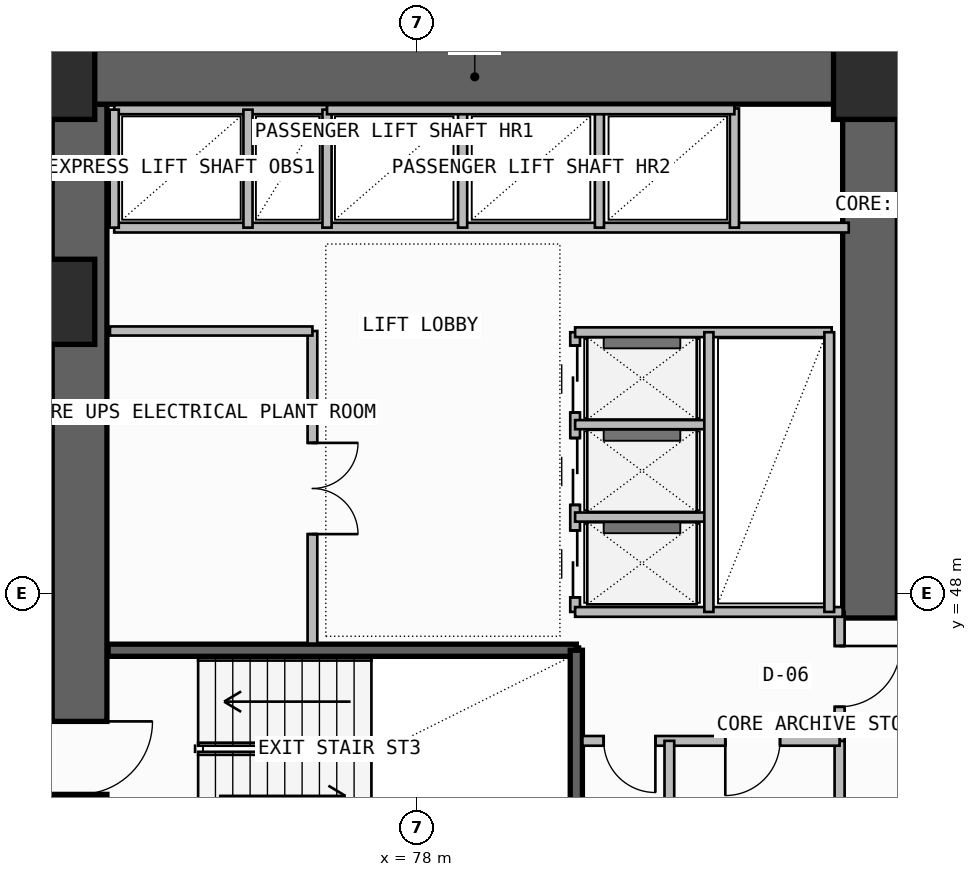
"""IFC4 building model, lengths in metres.
Left out: names, types, materials, properties, quantities, classifications, styles, units other than length and angle.
Written with IfcOpenShell. Run it as: python <this file> out.ifc"""

import sys

from ifc_helpers import new_model, si_unit, direction, frame, frame_2d, origin, origin_2d, place, context, subcontext, project, spatial, rectangle, extrude, element, fill, save


model = new_model("IFC4")
c1 = context("Model", 3, precision=1e-05, world=origin(), true_north=direction((0.0, 1.0)))
c2 = subcontext(c1, "Body", "Model", "MODEL_VIEW")
j1 = project(units=[si_unit("LENGTHUNIT", "METRE"), si_unit("PLANEANGLEUNIT", "RADIAN")], contexts=[c1])
p1 = place(None, origin())
s1 = spatial("IfcSite", under=j1, at=p1, CompositionType="ELEMENT")
p2 = place(p1, origin())
s2 = spatial("IfcBuilding", under=s1, at=p2, CompositionType="ELEMENT")
p3 = place(p2, frame((0.0, 0.0, 139.5)))
s3 = spatial("IfcBuildingStorey", under=s2, at=p3, CompositionType="ELEMENT", Elevation=139.5)
p4 = place(p3, frame((72.45, 43.35, -0.26), z_axis=(0.0, 0.0, 1.0), x_axis=(0.0, 1.0, 0.0)))
e1 = element("IfcWall", 1, at=p4, inside=s3, PredefinedType="SHEAR", context=c2, shape_type="SweptSolid", body=[
    extrude(rectangle(XDim=12.7, YDim=0.9, at=frame_2d((6.35, 0.0))), origin(), (0.0, 0.0, 1.0), 3.6),
])
p5 = place(p4, frame((1.35, 0.0, 0.26)))
e2 = element("IfcOpeningElement", 2, at=p5, cuts=e1, PredefinedType="OPENING", context=c2, shape_type="SweptSolid", body=[
    extrude(rectangle(XDim=1.2, YDim=2.2, at=frame_2d((0.6, 1.1))), frame((0.0, 0.46, 0.0), z_axis=(0.0, -1.0, 0.0), x_axis=(1.0, 0.0, 0.0)), (0.0, 0.0, 1.0), 0.92),
])
p6 = place(p3, frame((72.0, 56.5, -0.26), z_axis=(0.0, 0.0, 1.0), x_axis=(1.0, 0.0, 0.0)))
e3 = element("IfcWall", 3, at=p6, inside=s3, PredefinedType="SHEAR", context=c2, shape_type="SweptSolid", body=[
    extrude(rectangle(XDim=13.9, YDim=0.9, at=frame_2d((6.95, 0.0))), origin(), (0.0, 0.0, 1.0), 3.6),
])
p7 = place(p3, frame((85.45, 47.6, -0.26), z_axis=(0.0, 0.0, 1.0), x_axis=(0.0, 1.0, 0.0)))
e4 = element("IfcWall", 4, at=p7, inside=s3, PredefinedType="SHEAR", context=c2, shape_type="SweptSolid", body=[
    extrude(rectangle(XDim=8.45, YDim=0.9, at=frame_2d((4.225, 0.0))), origin(), (0.0, 0.0, 1.0), 3.6),
])
for number, where, z_axis, x_axis in (
    (5, (72.0, 52.8, 0.0), (0.0, 0.0, 1.0), (1.0, 0.0, 0.0)),
    (6, (72.0, 56.5, 0.0), (0.0, 0.0, 1.0), (1.0, 0.0, 0.0)),
    (7, (85.55, 56.5, 0.0), (0.0, 0.0, 1.0), (1.0, 0.0, 0.0)),
):
    element("IfcColumn", number, at=place(p3, frame(where, z_axis=z_axis, x_axis=x_axis)), inside=s3, PredefinedType="COLUMN", context=c2, shape_type="SweptSolid", body=[
        extrude(rectangle(XDim=1.4, YDim=1.4, at=origin_2d()), origin(), (0.0, 0.0, 1.0), 3.6),
    ])
p8 = place(p3, frame((72.92, 47.07, -0.26), z_axis=(0.0, 0.0, 1.0), x_axis=(1.0, 0.0, 0.0)))
e8 = element("IfcWall", 8, at=p8, inside=s3, PredefinedType="SOLIDWALL", context=c2, shape_type="SweptSolid", body=[
    extrude(rectangle(XDim=7.7, YDim=0.2, at=frame_2d((3.85, 0.0))), origin(), (0.0, 0.0, 1.0), 3.6),
])
p9 = place(p3, frame((80.62, 43.83, -0.26), z_axis=(0.0, 0.0, 1.0), x_axis=(0.0, 1.0, 0.0)))
e9 = element("IfcWall", 9, at=p9, inside=s3, PredefinedType="SOLIDWALL", context=c2, shape_type="SweptSolid", body=[
    extrude(rectangle(XDim=3.24, YDim=0.2, at=frame_2d((1.62, 0.0))), origin(), (0.0, 0.0, 1.0), 3.6),
])
p10 = place(p3, frame((84.95, 43.68, 0.0), z_axis=(0.0, 0.0, 1.0), x_axis=(0.0, 1.0, 0.0)))
e10 = element("IfcWall", 10, at=p10, inside=s3, PredefinedType="PLUMBINGWALL", context=c2, shape_type="SweptSolid", body=[
    extrude(rectangle(XDim=1.9, YDim=0.165, at=frame_2d((0.95, 0.0))), origin(), (0.0, 0.0, 1.0), 3.34),
])
p11 = place(p3, frame((84.95, 45.58, 0.0), z_axis=(0.0, 0.0, 1.0), x_axis=(0.0, 1.0, 0.0)))
e11 = element("IfcWall", 11, at=p11, inside=s3, PredefinedType="PARTITIONING", context=c2, shape_type="SweptSolid", body=[
    extrude(rectangle(XDim=2.12, YDim=0.165, at=frame_2d((1.06, 0.0))), origin(), (0.0, 0.0, 1.0), 3.34),
])
p12 = place(p11, frame((0.56, 0.0, 0.0)))
e12 = element("IfcOpeningElement", 12, at=p12, cuts=e11, PredefinedType="OPENING", context=c2, shape_type="SweptSolid", body=[
    extrude(rectangle(XDim=1.0, YDim=2.2, at=frame_2d((0.5, 1.1))), frame((0.0, 0.093, 0.0), z_axis=(0.0, -1.0, 0.0), x_axis=(1.0, 0.0, 0.0)), (0.0, 0.0, 1.0), 0.185),
])
p13 = place(p3, frame((80.72, 45.58, 0.0), z_axis=(0.0, 0.0, 1.0), x_axis=(1.0, 0.0, 0.0)))
e13 = element("IfcWall", 13, at=p13, inside=s3, PredefinedType="PLUMBINGWALL", context=c2, shape_type="SweptSolid", body=[
    extrude(rectangle(XDim=4.23, YDim=0.16, at=frame_2d((2.115, 0.0))), origin(), (0.0, 0.0, 1.0), 3.34),
])
p14 = place(p13, frame((0.35, 0.0, 0.0)))
e14 = element("IfcOpeningElement", 14, at=p14, cuts=e13, PredefinedType="OPENING", context=c2, shape_type="SweptSolid", body=[
    extrude(rectangle(XDim=0.85, YDim=2.05, at=frame_2d((0.425, 1.025))), frame((0.0, 0.09, 0.0), z_axis=(0.0, -1.0, 0.0), x_axis=(1.0, 0.0, 0.0)), (0.0, 0.0, 1.0), 0.18),
])
p15 = place(p13, frame((2.35, 0.0, 0.0)))
e15 = element("IfcOpeningElement", 15, at=p15, cuts=e13, PredefinedType="OPENING", context=c2, shape_type="SweptSolid", body=[
    extrude(rectangle(XDim=0.9, YDim=2.1, at=frame_2d((0.45, 1.05))), frame((0.0, 0.09, 0.0), z_axis=(0.0, -1.0, 0.0), x_axis=(1.0, 0.0, 0.0)), (0.0, 0.0, 1.0), 0.18),
])
p16 = place(p3, frame((82.15, 43.68, 0.0), z_axis=(0.0, 0.0, 1.0), x_axis=(0.0, 1.0, 0.0)))
e16 = element("IfcWall", 16, at=p16, inside=s3, PredefinedType="PLUMBINGWALL", context=c2, shape_type="SweptSolid", body=[
    extrude(rectangle(XDim=1.9, YDim=0.16, at=frame_2d((0.95, 0.0))), origin(), (0.0, 0.0, 1.0), 3.34),
])
p17 = place(p3, frame((76.28, 47.18, 0.0), z_axis=(0.0, 0.0, 1.0), x_axis=(0.0, 1.0, 0.0)))
e17 = element("IfcWall", 17, at=p17, inside=s3, PredefinedType="SOLIDWALL", context=c2, shape_type="SweptSolid", body=[
    extrude(rectangle(XDim=5.14, YDim=0.16, at=frame_2d((2.57, 0.0))), origin(), (0.0, 0.0, 1.0), 3.34),
])
p18 = place(p17, frame((1.8, 0.0, 0.0)))
e18 = element("IfcOpeningElement", 18, at=p18, cuts=e17, PredefinedType="OPENING", context=c2, shape_type="SweptSolid", body=[
    extrude(rectangle(XDim=1.5, YDim=2.25, at=frame_2d((0.75, 1.125))), frame((0.0, 0.09, 0.0), z_axis=(0.0, -1.0, 0.0), x_axis=(1.0, 0.0, 0.0)), (0.0, 0.0, 1.0), 0.18),
])
p19 = place(p3, frame((72.95, 52.32, 0.0), z_axis=(0.0, 0.0, 1.0), x_axis=(1.0, 0.0, 0.0)))
e19 = element("IfcWall", 19, at=p19, inside=s3, PredefinedType="SOLIDWALL", context=c2, shape_type="SweptSolid", body=[
    extrude(rectangle(XDim=3.33, YDim=0.15, at=frame_2d((1.665, 0.0))), origin(), (0.0, 0.0, 1.0), 3.34),
])
p20 = place(p3, frame((80.6, 47.7, 0.0), z_axis=(0.0, 0.0, 1.0), x_axis=(0.0, 1.0, 0.0)))
e20 = element("IfcWall", 20, at=p20, inside=s3, PredefinedType="SOLIDWALL", context=c2, shape_type="SweptSolid", body=[
    extrude(rectangle(XDim=4.6, YDim=0.16, at=frame_2d((2.3, 0.0))), origin(), (0.0, 0.0, 1.0), 3.34),
])
p21 = place(p20, frame((0.24, 0.0, 0.0)))
e21 = element("IfcOpeningElement", 21, at=p21, cuts=e20, PredefinedType="OPENING", context=c2, shape_type="SweptSolid", body=[
    extrude(rectangle(XDim=1.1, YDim=2.25, at=frame_2d((0.55, 1.125))), frame((0.0, 0.09, 0.0), z_axis=(0.0, -1.0, 0.0), x_axis=(1.0, 0.0, 0.0)), (0.0, 0.0, 1.0), 0.18),
])
p22 = place(p20, frame((1.76, 0.0, 0.0)))
e22 = element("IfcOpeningElement", 22, at=p22, cuts=e20, PredefinedType="OPENING", context=c2, shape_type="SweptSolid", body=[
    extrude(rectangle(XDim=1.1, YDim=2.25, at=frame_2d((0.55, 1.125))), frame((0.0, 0.09, 0.0), z_axis=(0.0, -1.0, 0.0), x_axis=(1.0, 0.0, 0.0)), (0.0, 0.0, 1.0), 0.18),
])
p23 = place(p20, frame((3.28, 0.0, 0.0)))
e23 = element("IfcOpeningElement", 23, at=p23, cuts=e20, PredefinedType="OPENING", context=c2, shape_type="SweptSolid", body=[
    extrude(rectangle(XDim=1.1, YDim=2.25, at=frame_2d((0.55, 1.125))), frame((0.0, 0.09, 0.0), z_axis=(0.0, -1.0, 0.0), x_axis=(1.0, 0.0, 0.0)), (0.0, 0.0, 1.0), 0.18),
])
p24 = place(p3, frame((80.6, 47.7, 0.0), z_axis=(0.0, 0.0, 1.0), x_axis=(1.0, 0.0, 0.0)))
e24 = element("IfcWall", 24, at=p24, inside=s3, PredefinedType="SOLIDWALL", context=c2, shape_type="SweptSolid", body=[
    extrude(rectangle(XDim=4.4, YDim=0.16, at=frame_2d((2.2, 0.0))), origin(), (0.0, 0.0, 1.0), 3.34),
])
p25 = place(p3, frame((80.6, 52.3, 0.0), z_axis=(0.0, 0.0, 1.0), x_axis=(1.0, 0.0, 0.0)))
e25 = element("IfcWall", 25, at=p25, inside=s3, PredefinedType="SOLIDWALL", context=c2, shape_type="SweptSolid", body=[
    extrude(rectangle(XDim=4.22, YDim=0.16, at=frame_2d((2.11, 0.0))), origin(), (0.0, 0.0, 1.0), 3.34),
])
for number, where, z_axis, x_axis in (
    (26, (80.6, 49.26, 0.0), (0.0, 0.0, 1.0), (1.0, 0.0, 0.0)),
    (27, (80.6, 50.78, 0.0), (0.0, 0.0, 1.0), (1.0, 0.0, 0.0)),
):
    element("IfcWall", number, at=place(p3, frame(where, z_axis=z_axis, x_axis=x_axis)), inside=s3, PredefinedType="PLUMBINGWALL", context=c2, shape_type="SweptSolid", body=[
        extrude(rectangle(XDim=2.2, YDim=0.15, at=frame_2d((1.1, 0.0))), origin(), (0.0, 0.0, 1.0), 3.34),
    ])
p26 = place(p3, frame((82.8, 47.7, 0.0), z_axis=(0.0, 0.0, 1.0), x_axis=(0.0, 1.0, 0.0)))
e28 = element("IfcWall", 28, at=p26, inside=s3, PredefinedType="PLUMBINGWALL", context=c2, shape_type="SweptSolid", body=[
    extrude(rectangle(XDim=4.6, YDim=0.15, at=frame_2d((2.3, 0.0))), origin(), (0.0, 0.0, 1.0), 3.34),
])
p27 = place(p3, frame((84.78, 47.7, 0.0), z_axis=(0.0, 0.0, 1.0), x_axis=(0.0, 1.0, 0.0)))
e29 = element("IfcWall", 29, at=p27, inside=s3, PredefinedType="SOLIDWALL", context=c2, shape_type="SweptSolid", body=[
    extrude(rectangle(XDim=4.6, YDim=0.16, at=frame_2d((2.3, 0.0))), origin(), (0.0, 0.0, 1.0), 3.34),
])
p28 = place(p3, frame((73.02, 54.02, 0.0), z_axis=(0.0, 0.0, 1.0), x_axis=(1.0, 0.0, 0.0)))
e30 = element("IfcWall", 30, at=p28, inside=s3, PredefinedType="SOLIDWALL", context=c2, shape_type="SweptSolid", body=[
    extrude(rectangle(XDim=12.08, YDim=0.16, at=frame_2d((6.04, 0.0))), origin(), (0.0, 0.0, 1.0), 3.34),
])
p29 = place(p3, frame((73.02, 55.96, 0.0), z_axis=(0.0, 0.0, 1.0), x_axis=(1.0, 0.0, 0.0)))
e31 = element("IfcWall", 31, at=p29, inside=s3, PredefinedType="SOLIDWALL", context=c2, shape_type="SweptSolid", body=[
    extrude(rectangle(XDim=3.5, YDim=0.15, at=frame_2d((1.75, 0.0))), origin(), (0.0, 0.0, 1.0), 3.34),
])
p30 = place(p3, frame((73.02, 54.02, 0.0), z_axis=(0.0, 0.0, 1.0), x_axis=(0.0, 1.0, 0.0)))
e32 = element("IfcWall", 32, at=p30, inside=s3, PredefinedType="PLUMBINGWALL", context=c2, shape_type="SweptSolid", body=[
    extrude(rectangle(XDim=1.94, YDim=0.15, at=frame_2d((0.97, 0.0))), origin(), (0.0, 0.0, 1.0), 3.34),
])
p31 = place(p3, frame((76.52, 54.02, 0.0), z_axis=(0.0, 0.0, 1.0), x_axis=(0.0, 1.0, 0.0)))
e33 = element("IfcWall", 33, at=p31, inside=s3, PredefinedType="SOLIDWALL", context=c2, shape_type="SweptSolid", body=[
    extrude(rectangle(XDim=1.94, YDim=0.15, at=frame_2d((0.97, 0.0))), origin(), (0.0, 0.0, 1.0), 3.34),
])
p32 = place(p3, frame((75.22, 54.02, 0.0), z_axis=(0.0, 0.0, 1.0), x_axis=(0.0, 1.0, 0.0)))
e34 = element("IfcWall", 34, at=p32, inside=s3, PredefinedType="PLUMBINGWALL", context=c2, shape_type="SweptSolid", body=[
    extrude(rectangle(XDim=1.94, YDim=0.15, at=frame_2d((0.97, 0.0))), origin(), (0.0, 0.0, 1.0), 3.34),
])
for number, where, z_axis, x_axis in (
    (35, (78.75, 54.02, 0.0), (0.0, 0.0, 1.0), (0.0, 1.0, 0.0)),
    (36, (81.0, 54.02, 0.0), (0.0, 0.0, 1.0), (0.0, 1.0, 0.0)),
):
    element("IfcWall", number, at=place(p3, frame(where, z_axis=z_axis, x_axis=x_axis)), inside=s3, PredefinedType="PLUMBINGWALL", context=c2, shape_type="SweptSolid", body=[
        extrude(rectangle(XDim=1.96, YDim=0.15, at=frame_2d((0.98, 0.0))), origin(), (0.0, 0.0, 1.0), 3.34),
    ])
p33 = place(p3, frame((83.22, 54.02, 0.0), z_axis=(0.0, 0.0, 1.0), x_axis=(0.0, 1.0, 0.0)))
e37 = element("IfcWall", 37, at=p33, inside=s3, PredefinedType="SOLIDWALL", context=c2, shape_type="SweptSolid", body=[
    extrude(rectangle(XDim=1.96, YDim=0.15, at=frame_2d((0.98, 0.0))), origin(), (0.0, 0.0, 1.0), 3.34),
])
p34 = place(p3, frame((76.52, 55.96, 0.0), z_axis=(0.0, 0.0, 1.0), x_axis=(1.0, 0.0, 0.0)))
e38 = element("IfcWall", 38, at=p34, inside=s3, PredefinedType="SOLIDWALL", context=c2, shape_type="SweptSolid", body=[
    extrude(rectangle(XDim=6.7, YDim=0.15, at=frame_2d((3.35, 0.0))), origin(), (0.0, 0.0, 1.0), 3.34),
])
p35 = place(p5, frame((1.2, 0.0, 0.0), z_axis=(0.0, 0.0, 1.0), x_axis=(-1.0, 0.0, 0.0)))
e39 = element("IfcDoor", 39, at=p35, inside=s3, OperationType="SINGLE_SWING_LEFT", PredefinedType="USERDEFINED", context=c2, shape_type="SweptSolid", body=[
    extrude(rectangle(XDim=1.2, YDim=2.2, at=frame_2d((0.6, 1.1))), frame((0.0, 0.025, 0.0), z_axis=(0.0, -1.0, 0.0), x_axis=(1.0, 0.0, 0.0)), (0.0, 0.0, 1.0), 0.05),
])
fill(e2, e39)
p36 = place(p12, frame((1.0, 0.0, 0.0), z_axis=(0.0, 0.0, 1.0), x_axis=(-1.0, 0.0, 0.0)))
e40 = element("IfcDoor", 40, at=p36, inside=s3, OperationType="SINGLE_SWING_LEFT", PredefinedType="DOOR", context=c2, shape_type="SweptSolid", body=[
    extrude(rectangle(XDim=1.0, YDim=2.2, at=frame_2d((0.5, 1.1))), frame((0.0, 0.025, 0.0), z_axis=(0.0, -1.0, 0.0), x_axis=(1.0, 0.0, 0.0)), (0.0, 0.0, 1.0), 0.05),
])
fill(e12, e40)
p37 = place(p14, frame((0.85, 0.0, 0.0), z_axis=(0.0, 0.0, 1.0), x_axis=(-1.0, 0.0, 0.0)))
e41 = element("IfcDoor", 41, at=p37, inside=s3, OperationType="SINGLE_SWING_LEFT", PredefinedType="DOOR", context=c2, shape_type="SweptSolid", body=[
    extrude(rectangle(XDim=0.85, YDim=2.05, at=frame_2d((0.425, 1.025))), frame((0.0, 0.025, 0.0), z_axis=(0.0, -1.0, 0.0), x_axis=(1.0, 0.0, 0.0)), (0.0, 0.0, 1.0), 0.05),
])
fill(e14, e41)
p38 = place(p15, frame((0.9, 0.0, 0.0), z_axis=(0.0, 0.0, 1.0), x_axis=(-1.0, 0.0, 0.0)))
e42 = element("IfcDoor", 42, at=p38, inside=s3, OperationType="SINGLE_SWING_RIGHT", PredefinedType="DOOR", context=c2, shape_type="SweptSolid", body=[
    extrude(rectangle(XDim=0.9, YDim=2.1, at=frame_2d((0.45, 1.05))), frame((0.0, 0.025, 0.0), z_axis=(0.0, -1.0, 0.0), x_axis=(1.0, 0.0, 0.0)), (0.0, 0.0, 1.0), 0.05),
])
fill(e15, e42)
p39 = place(p18, frame((1.5, 0.0, 0.0), z_axis=(0.0, 0.0, 1.0), x_axis=(-1.0, 0.0, 0.0)))
e43 = element("IfcDoor", 43, at=p39, inside=s3, OperationType="DOUBLE_DOOR_SINGLE_SWING", PredefinedType="DOOR", context=c2, shape_type="SweptSolid", body=[
    extrude(rectangle(XDim=1.5, YDim=2.25, at=frame_2d((0.75, 1.125))), frame((0.0, 0.025, 0.0), z_axis=(0.0, -1.0, 0.0), x_axis=(1.0, 0.0, 0.0)), (0.0, 0.0, 1.0), 0.05),
])
fill(e18, e43)
p40 = place(p21, frame((1.1, 0.0, 0.0), z_axis=(0.0, 0.0, 1.0), x_axis=(-1.0, 0.0, 0.0)))
e44 = element("IfcDoor", 44, at=p40, inside=s3, OperationType="DOUBLE_DOOR_SLIDING", PredefinedType="DOOR", context=c2, shape_type="SweptSolid", body=[
    extrude(rectangle(XDim=1.1, YDim=2.25, at=frame_2d((0.55, 1.125))), frame((0.0, 0.025, 0.0), z_axis=(0.0, -1.0, 0.0), x_axis=(1.0, 0.0, 0.0)), (0.0, 0.0, 1.0), 0.05),
])
fill(e21, e44)
p41 = place(p22, frame((1.1, 0.0, 0.0), z_axis=(0.0, 0.0, 1.0), x_axis=(-1.0, 0.0, 0.0)))
e45 = element("IfcDoor", 45, at=p41, inside=s3, OperationType="DOUBLE_DOOR_SLIDING", PredefinedType="DOOR", context=c2, shape_type="SweptSolid", body=[
    extrude(rectangle(XDim=1.1, YDim=2.25, at=frame_2d((0.55, 1.125))), frame((0.0, 0.025, 0.0), z_axis=(0.0, -1.0, 0.0), x_axis=(1.0, 0.0, 0.0)), (0.0, 0.0, 1.0), 0.05),
])
fill(e22, e45)
p42 = place(p23, frame((1.1, 0.0, 0.0), z_axis=(0.0, 0.0, 1.0), x_axis=(-1.0, 0.0, 0.0)))
e46 = element("IfcDoor", 46, at=p42, inside=s3, OperationType="DOUBLE_DOOR_SLIDING", PredefinedType="DOOR", context=c2, shape_type="SweptSolid", body=[
    extrude(rectangle(XDim=1.1, YDim=2.25, at=frame_2d((0.55, 1.125))), frame((0.0, 0.025, 0.0), z_axis=(0.0, -1.0, 0.0), x_axis=(1.0, 0.0, 0.0)), (0.0, 0.0, 1.0), 0.05),
])
fill(e23, e46)
save(model, sys.argv[1])
